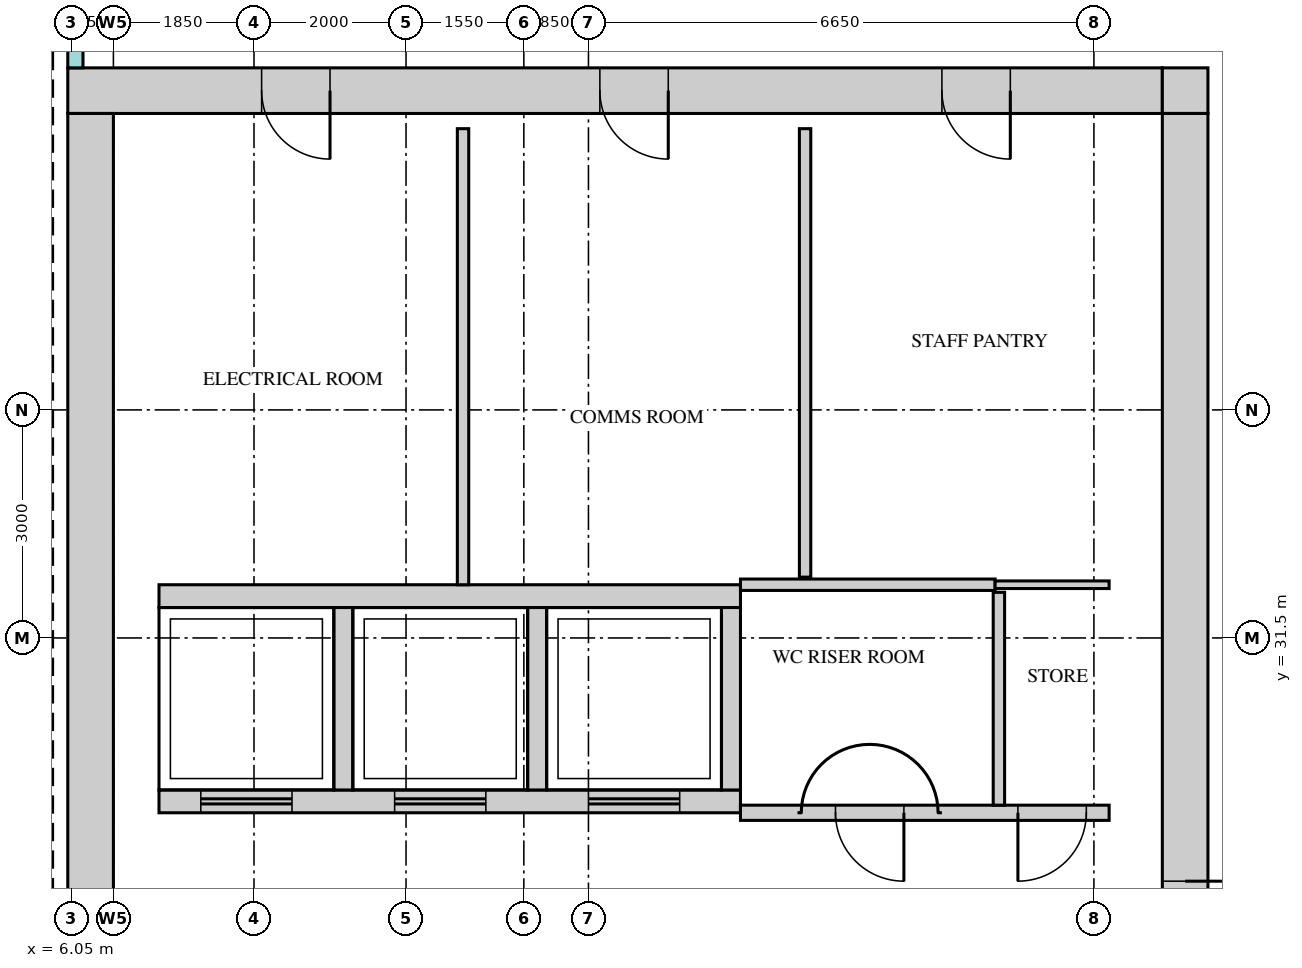
"""IFC4 building model, lengths in metres.
Left out: names, types, materials, properties, quantities, classifications, styles, units other than length and angle.
Written with IfcOpenShell. Run it as: python <this file> out.ifc"""

import sys

from ifc_helpers import new_model, si_unit, direction, frame, frame_2d, origin, place, context, subcontext, project, spatial, rectangle, extrude, source, transform, mapped, element, fill, save


model = new_model("IFC4")
c1 = context("Model", 3, precision=1e-05, world=origin(), true_north=direction((0.0, 1.0)))
c2 = subcontext(c1, "Body", "Model", "MODEL_VIEW")
j1 = project(units=[si_unit("LENGTHUNIT", "METRE"), si_unit("PLANEANGLEUNIT", "RADIAN")], contexts=[c1])
p1 = place(None, origin())
s1 = spatial("IfcSite", under=j1, at=p1, CompositionType="ELEMENT")
p2 = place(p1, origin())
s2 = spatial("IfcBuilding", under=s1, at=p2, CompositionType="ELEMENT")
p3 = place(p2, frame((0.0, 0.0, 286.2)))
s3 = spatial("IfcBuildingStorey", under=s2, at=p3, CompositionType="ELEMENT", Elevation=286.2)
m1 = source(origin(), c2, "Body", "SweptSolid", [
    extrude(rectangle(XDim=14.4, YDim=0.6, at=frame_2d((7.2, 0.0))), origin(), (0.0, 0.0, 1.0), 3.75),
])
p4 = place(p3, frame((6.0, 38.7, 0.0), z_axis=(0.0, 0.0, 1.0), x_axis=(1.0, 0.0, 0.0)))
e1 = element("IfcWall", 1, at=p4, inside=s3, PredefinedType="SHEAR", context=c2, shape_type="MappedRepresentation", body=[
    mapped(m1, transform((0.0, 0.0, 0.0))),
])
m2 = source(origin(), c2, "Body", "SweptSolid", [
    extrude(rectangle(XDim=0.9, YDim=2.1, at=frame_2d((0.45, 1.05))), frame((0.0, 0.31, 0.0), z_axis=(0.0, -1.0, 0.0), x_axis=(1.0, 0.0, 0.0)), (0.0, 0.0, 1.0), 0.62),
])
p5 = place(p4, frame((2.55, 0.0, 0.0)))
e2 = element("IfcOpeningElement", 2, at=p5, cuts=e1, PredefinedType="OPENING", context=c2, shape_type="MappedRepresentation", body=[
    mapped(m2, transform((0.0, 0.0, 0.0))),
])
p6 = place(p4, frame((7.0, 0.0, 0.0)))
e3 = element("IfcOpeningElement", 3, at=p6, cuts=e1, PredefinedType="OPENING", context=c2, shape_type="MappedRepresentation", body=[
    mapped(m2, transform((0.0, 0.0, 0.0))),
])
p7 = place(p4, frame((11.5, 0.0, 0.0)))
e4 = element("IfcOpeningElement", 4, at=p7, cuts=e1, PredefinedType="OPENING", context=c2, shape_type="MappedRepresentation", body=[
    mapped(m2, transform((0.0, 0.0, 0.0))),
])
m3 = source(origin(), c2, "Body", "SweptSolid", [
    extrude(rectangle(XDim=0.6, YDim=0.6, at=frame_2d((0.3, 0.0))), origin(), (0.0, 0.0, 1.0), 3.75),
])
p8 = place(p3, frame((20.4, 38.7, 0.0), z_axis=(0.0, 0.0, 1.0), x_axis=(1.0, 0.0, 0.0)))
e5 = element("IfcWall", 5, at=p8, inside=s3, PredefinedType="SHEAR", context=c2, shape_type="MappedRepresentation", body=[
    mapped(m3, transform((0.0, 0.0, 0.0))),
])
m4 = source(origin(), c2, "Body", "SweptSolid", [
    extrude(rectangle(XDim=22.8, YDim=0.6, at=frame_2d((11.4, 0.0))), origin(), (0.0, 0.0, 1.0), 3.75),
])
p9 = place(p3, frame((20.7, 15.6, 0.0), z_axis=(0.0, 0.0, 1.0), x_axis=(0.0, 1.0, 0.0)))
e6 = element("IfcWall", 6, at=p9, inside=s3, PredefinedType="SHEAR", context=c2, shape_type="MappedRepresentation", body=[
    mapped(m4, transform((0.0, 0.0, 0.0))),
])
m5 = source(origin(), c2, "Body", "SweptSolid", [
    extrude(rectangle(XDim=1.8, YDim=2.1, at=frame_2d((0.9, 1.05))), frame((0.0, 0.31, 0.0), z_axis=(0.0, -1.0, 0.0), x_axis=(1.0, 0.0, 0.0)), (0.0, 0.0, 1.0), 0.62),
])
p10 = place(p9, frame((10.9, 0.0, 0.0)))
e7 = element("IfcOpeningElement", 7, at=p10, cuts=e6, PredefinedType="OPENING", context=c2, shape_type="MappedRepresentation", body=[
    mapped(m5, transform((0.0, 0.0, 0.0))),
])
p11 = place(p9, frame((0.55, 0.0, 0.0)))
e8 = element("IfcOpeningElement", 8, at=p11, cuts=e6, PredefinedType="OPENING", context=c2, shape_type="MappedRepresentation", body=[
    mapped(m2, transform((0.0, 0.0, 0.0))),
])
m6 = source(origin(), c2, "Body", "SweptSolid", [
    extrude(rectangle(XDim=1.0, YDim=2.1, at=frame_2d((0.5, 1.05))), frame((0.0, 0.31, 0.0), z_axis=(0.0, -1.0, 0.0), x_axis=(1.0, 0.0, 0.0)), (0.0, 0.0, 1.0), 0.62),
])
p12 = place(p9, frame((2.3, 0.0, 0.0)))
e9 = element("IfcOpeningElement", 9, at=p12, cuts=e6, PredefinedType="OPENING", context=c2, shape_type="MappedRepresentation", body=[
    mapped(m6, transform((0.0, 0.0, 0.0))),
])
p13 = place(p9, frame((5.1, 0.0, 0.0)))
e10 = element("IfcOpeningElement", 10, at=p13, cuts=e6, PredefinedType="OPENING", context=c2, shape_type="MappedRepresentation", body=[
    mapped(m2, transform((0.0, 0.0, 0.0))),
])
p14 = place(p3, frame((6.3, 15.6, 0.0), z_axis=(0.0, 0.0, 1.0), x_axis=(0.0, 1.0, 0.0)))
e11 = element("IfcWall", 11, at=p14, inside=s3, PredefinedType="SHEAR", context=c2, shape_type="MappedRepresentation", body=[
    mapped(m4, transform((0.0, 0.0, 0.0))),
])
m7 = source(origin(), c2, "Body", "SweptSolid", [
    extrude(rectangle(XDim=7.65, YDim=0.3, at=frame_2d((3.825, 0.0))), origin(), (0.0, 0.0, 1.0), 3.75),
])
p15 = place(p3, frame((7.2, 32.05, 0.0), z_axis=(0.0, 0.0, 1.0), x_axis=(1.0, 0.0, 0.0)))
e12 = element("IfcWall", 12, at=p15, inside=s3, PredefinedType="STANDARD", context=c2, shape_type="MappedRepresentation", body=[
    mapped(m7, transform((0.0, 0.0, 0.0))),
])
p16 = place(p3, frame((7.2, 29.35, 0.0), z_axis=(0.0, 0.0, 1.0), x_axis=(1.0, 0.0, 0.0)))
e13 = element("IfcWall", 13, at=p16, inside=s3, PredefinedType="STANDARD", context=c2, shape_type="MappedRepresentation", body=[
    mapped(m7, transform((0.0, 0.0, 0.0))),
])
m8 = source(origin(), c2, "Body", "SweptSolid", [
    extrude(rectangle(XDim=1.2, YDim=2.1, at=frame_2d((0.6, 1.05))), frame((0.0, 0.16, 0.0), z_axis=(0.0, -1.0, 0.0), x_axis=(1.0, 0.0, 0.0)), (0.0, 0.0, 1.0), 0.32),
])
p17 = place(p16, frame((0.55, 0.0, 0.0)))
e14 = element("IfcOpeningElement", 14, at=p17, cuts=e13, PredefinedType="OPENING", context=c2, shape_type="MappedRepresentation", body=[
    mapped(m8, transform((0.0, 0.0, 0.0))),
])
p18 = place(p16, frame((3.1, 0.0, 0.0)))
e15 = element("IfcOpeningElement", 15, at=p18, cuts=e13, PredefinedType="OPENING", context=c2, shape_type="MappedRepresentation", body=[
    mapped(m8, transform((0.0, 0.0, 0.0))),
])
p19 = place(p16, frame((5.65, 0.0, 0.0)))
e16 = element("IfcOpeningElement", 16, at=p19, cuts=e13, PredefinedType="OPENING", context=c2, shape_type="MappedRepresentation", body=[
    mapped(m8, transform((0.0, 0.0, 0.0))),
])
m9 = source(origin(), c2, "Body", "SweptSolid", [
    extrude(rectangle(XDim=2.4, YDim=0.25, at=frame_2d((1.2, 0.0))), origin(), (0.0, 0.0, 1.0), 3.75),
])
for number, where, z_axis, x_axis in (
    (17, (9.625, 29.5, 0.0), (0.0, 0.0, 1.0), (0.0, 1.0, 0.0)),
    (18, (12.175, 29.5, 0.0), (0.0, 0.0, 1.0), (0.0, 1.0, 0.0)),
    (19, (14.725, 29.5, 0.0), (0.0, 0.0, 1.0), (0.0, 1.0, 0.0)),
):
    element("IfcWall", number, at=place(p3, frame(where, z_axis=z_axis, x_axis=x_axis)), inside=s3, PredefinedType="STANDARD", context=c2, shape_type="MappedRepresentation", body=[
        mapped(m9, transform((0.0, 0.0, 0.0))),
    ])
m10 = source(origin(), c2, "Body", "SweptSolid", [
    extrude(rectangle(XDim=4.85, YDim=0.2, at=frame_2d((2.425, 0.0))), origin(), (0.0, 0.0, 1.0), 3.8),
])
p20 = place(p3, frame((14.85, 29.2, 0.0), z_axis=(0.0, 0.0, 1.0), x_axis=(1.0, 0.0, 0.0)))
e20 = element("IfcWall", 20, at=p20, inside=s3, PredefinedType="PARTITIONING", context=c2, shape_type="MappedRepresentation", body=[
    mapped(m10, transform((0.0, 0.0, 0.0))),
])
m11 = source(origin(), c2, "Body", "SweptSolid", [
    extrude(rectangle(XDim=0.9, YDim=2.1, at=frame_2d((0.45, 1.05))), frame((0.0, 0.11, 0.0), z_axis=(0.0, -1.0, 0.0), x_axis=(1.0, 0.0, 0.0)), (0.0, 0.0, 1.0), 0.22),
])
p21 = place(p20, frame((1.25, 0.0, 0.0)))
e21 = element("IfcOpeningElement", 21, at=p21, cuts=e20, PredefinedType="OPENING", context=c2, shape_type="MappedRepresentation", body=[
    mapped(m11, transform((0.0, 0.0, 0.0))),
])
p22 = place(p20, frame((3.65, 0.0, 0.0)))
e22 = element("IfcOpeningElement", 22, at=p22, cuts=e20, PredefinedType="OPENING", context=c2, shape_type="MappedRepresentation", body=[
    mapped(m11, transform((0.0, 0.0, 0.0))),
])
m12 = source(origin(), c2, "Body", "SweptSolid", [
    extrude(rectangle(XDim=2.8, YDim=0.15, at=frame_2d((1.4, 0.0))), origin(), (0.0, 0.0, 1.0), 3.8),
])
p23 = place(p3, frame((18.25, 29.3, 0.0), z_axis=(0.0, 0.0, 1.0), x_axis=(0.0, 1.0, 0.0)))
e23 = element("IfcWall", 23, at=p23, inside=s3, PredefinedType="PARTITIONING", context=c2, shape_type="MappedRepresentation", body=[
    mapped(m12, transform((0.0, 0.0, 0.0))),
])
m13 = source(origin(), c2, "Body", "SweptSolid", [
    extrude(rectangle(XDim=6.0, YDim=0.15, at=frame_2d((3.0, 0.0))), origin(), (0.0, 0.0, 1.0), 3.8),
])
p24 = place(p3, frame((11.2, 32.2, 0.0), z_axis=(0.0, 0.0, 1.0), x_axis=(0.0, 1.0, 0.0)))
e24 = element("IfcWall", 24, at=p24, inside=s3, PredefinedType="PARTITIONING", context=c2, shape_type="MappedRepresentation", body=[
    mapped(m13, transform((0.0, 0.0, 0.0))),
])
m14 = source(origin(), c2, "Body", "SweptSolid", [
    extrude(rectangle(XDim=3.35, YDim=0.15, at=frame_2d((1.675, 0.0))), origin(), (0.0, 0.0, 1.0), 3.8),
])
p25 = place(p3, frame((14.85, 32.2, 0.0), z_axis=(0.0, 0.0, 1.0), x_axis=(1.0, 0.0, 0.0)))
e25 = element("IfcWall", 25, at=p25, inside=s3, PredefinedType="PARTITIONING", context=c2, shape_type="MappedRepresentation", body=[
    mapped(m14, transform((0.0, 0.0, 0.0))),
])
m15 = source(origin(), c2, "Body", "SweptSolid", [
    extrude(rectangle(XDim=1.5, YDim=0.1, at=frame_2d((0.75, 0.0))), origin(), (0.0, 0.0, 1.0), 3.8),
])
p26 = place(p3, frame((18.2, 32.2, 0.0), z_axis=(0.0, 0.0, 1.0), x_axis=(1.0, 0.0, 0.0)))
e26 = element("IfcWall", 26, at=p26, inside=s3, PredefinedType="PARTITIONING", context=c2, shape_type="MappedRepresentation", body=[
    mapped(m15, transform((0.0, 0.0, 0.0))),
])
m16 = source(origin(), c2, "Body", "SweptSolid", [
    extrude(rectangle(XDim=5.9, YDim=0.15, at=frame_2d((2.95, 0.0))), origin(), (0.0, 0.0, 1.0), 3.8),
])
p27 = place(p3, frame((15.7, 32.3, 0.0), z_axis=(0.0, 0.0, 1.0), x_axis=(0.0, 1.0, 0.0)))
e27 = element("IfcWall", 27, at=p27, inside=s3, PredefinedType="PARTITIONING", context=c2, shape_type="MappedRepresentation", body=[
    mapped(m16, transform((0.0, 0.0, 0.0))),
])
m17 = source(origin(), c2, "Body", "SweptSolid", [
    extrude(rectangle(XDim=0.9, YDim=2.1, at=frame_2d((0.45, 1.05))), frame((0.0, 0.025, 0.0), z_axis=(0.0, -1.0, 0.0), x_axis=(1.0, 0.0, 0.0)), (0.0, 0.0, 1.0), 0.05),
])
p28 = place(p21, origin())
e28 = element("IfcDoor", 28, at=p28, inside=s3, OperationType="SINGLE_SWING_RIGHT", PredefinedType="DOOR", context=c2, shape_type="MappedRepresentation", body=[
    mapped(m17, transform((0.0, 0.0, 0.0))),
])
fill(e21, e28)
p29 = place(p22, origin())
e29 = element("IfcDoor", 29, at=p29, inside=s3, OperationType="SINGLE_SWING_LEFT", PredefinedType="DOOR", context=c2, shape_type="MappedRepresentation", body=[
    mapped(m17, transform((0.0, 0.0, 0.0))),
])
fill(e22, e29)
m18 = source(origin(), c2, "Body", "SweptSolid", [
    extrude(rectangle(XDim=1.8, YDim=2.1, at=frame_2d((0.9, 1.05))), frame((0.0, 0.25, 0.0), z_axis=(0.0, -1.0, 0.0), x_axis=(1.0, 0.0, 0.0)), (0.0, 0.0, 1.0), 0.5),
])
p30 = place(p10, origin())
e30 = element("IfcDoor", 30, at=p30, inside=s3, OperationType="DOUBLE_DOOR_SINGLE_SWING", PredefinedType="DOOR", context=c2, shape_type="MappedRepresentation", body=[
    mapped(m18, transform((0.0, 0.0, 0.0))),
])
fill(e7, e30)
m19 = source(origin(), c2, "Body", "SweptSolid", [
    extrude(rectangle(XDim=0.9, YDim=2.1, at=frame_2d((0.45, 1.05))), frame((0.0, 0.25, 0.0), z_axis=(0.0, -1.0, 0.0), x_axis=(1.0, 0.0, 0.0)), (0.0, 0.0, 1.0), 0.5),
])
p31 = place(p5, origin())
e31 = element("IfcDoor", 31, at=p31, inside=s3, OperationType="SINGLE_SWING_RIGHT", PredefinedType="DOOR", context=c2, shape_type="MappedRepresentation", body=[
    mapped(m19, transform((0.0, 0.0, 0.0))),
])
fill(e2, e31)
p32 = place(p6, origin())
e32 = element("IfcDoor", 32, at=p32, inside=s3, OperationType="SINGLE_SWING_RIGHT", PredefinedType="DOOR", context=c2, shape_type="MappedRepresentation", body=[
    mapped(m19, transform((0.0, 0.0, 0.0))),
])
fill(e3, e32)
p33 = place(p7, origin())
e33 = element("IfcDoor", 33, at=p33, inside=s3, OperationType="SINGLE_SWING_RIGHT", PredefinedType="DOOR", context=c2, shape_type="MappedRepresentation", body=[
    mapped(m19, transform((0.0, 0.0, 0.0))),
])
fill(e4, e33)
m20 = source(origin(), c2, "Body", "SweptSolid", [
    extrude(rectangle(XDim=1.2, YDim=2.1, at=frame_2d((0.6, 1.05))), frame((0.0, 0.025, 0.0), z_axis=(0.0, -1.0, 0.0), x_axis=(1.0, 0.0, 0.0)), (0.0, 0.0, 1.0), 0.05),
])
p34 = place(p17, origin())
e34 = element("IfcDoor", 34, at=p34, inside=s3, OperationType="DOUBLE_DOOR_SLIDING", PredefinedType="DOOR", context=c2, shape_type="MappedRepresentation", body=[
    mapped(m20, transform((0.0, 0.0, 0.0))),
])
fill(e14, e34)
p35 = place(p18, origin())
e35 = element("IfcDoor", 35, at=p35, inside=s3, OperationType="DOUBLE_DOOR_SLIDING", PredefinedType="DOOR", context=c2, shape_type="MappedRepresentation", body=[
    mapped(m20, transform((0.0, 0.0, 0.0))),
])
fill(e15, e35)
p36 = place(p19, origin())
e36 = element("IfcDoor", 36, at=p36, inside=s3, OperationType="DOUBLE_DOOR_SLIDING", PredefinedType="DOOR", context=c2, shape_type="MappedRepresentation", body=[
    mapped(m20, transform((0.0, 0.0, 0.0))),
])
fill(e16, e36)
save(model, sys.argv[1])
